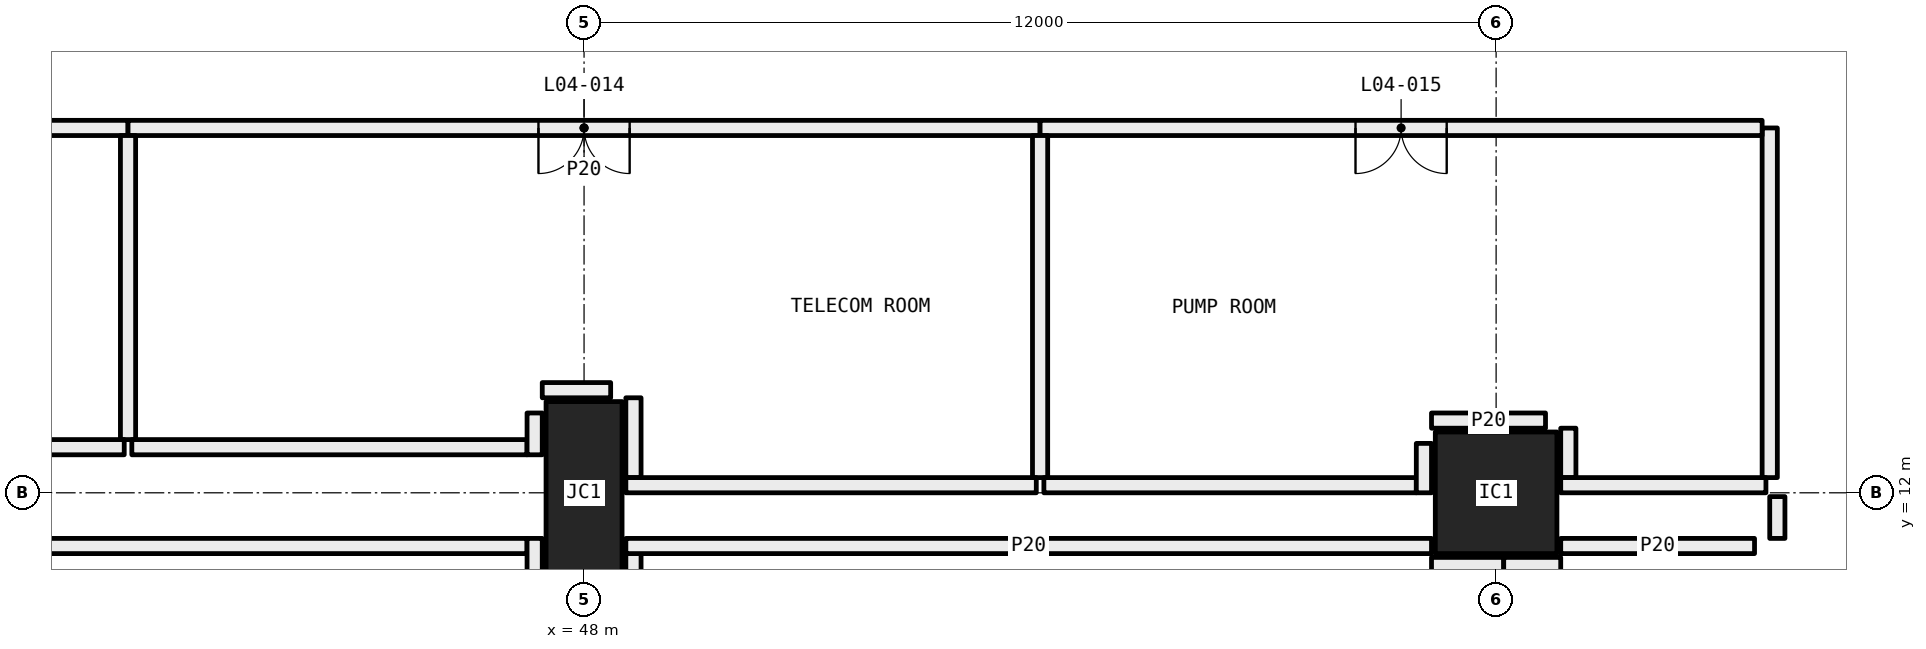
"""IFC4 building model, lengths in metres.
Left out: names, types, materials, properties, quantities, classifications, styles, units other than length and angle.
Written with IfcOpenShell. Run it as: python <this file> out.ifc"""

import sys

from ifc_helpers import new_model, si_unit, direction, frame, frame_2d, origin, origin_2d, place, context, subcontext, project, spatial, rectangle, hollow_rectangle, extrude, element, fill, save


model = new_model("IFC4")
c1 = context("Model", 3, precision=1e-05, world=origin(), true_north=direction((0.0, 1.0)))
c2 = subcontext(c1, "Body", "Model", "MODEL_VIEW")
j1 = project(units=[si_unit("LENGTHUNIT", "METRE"), si_unit("PLANEANGLEUNIT", "RADIAN")], contexts=[c1])
p1 = place(None, origin())
s1 = spatial("IfcSite", under=j1, at=p1, CompositionType="ELEMENT")
p2 = place(p1, origin())
s2 = spatial("IfcBuilding", under=s1, at=p2, CompositionType="ELEMENT")
p3 = place(p2, frame((0.0, 0.0, 24.0)))
s3 = spatial("IfcBuildingStorey", under=s2, at=p3, CompositionType="ELEMENT", Elevation=24.0)
p4 = place(p3, frame((48.0, 12.0, 0.0), z_axis=(0.0, 0.0, 1.0), x_axis=(0.0, 1.0, 0.0)))
e1 = element("IfcColumn", 1, at=p4, inside=s3, PredefinedType="COLUMN", context=c2, shape_type="SweptSolid", body=[
    extrude(hollow_rectangle(XDim=2.4, YDim=1.0, WallThickness=0.09, at=origin_2d()), origin(), (0.0, 0.0, 1.0), 5.6),
])
p5 = place(p3, frame((60.0, 12.0, 0.0), z_axis=(0.0, 0.0, 1.0), x_axis=(1.0, 0.0, 0.0)))
e2 = element("IfcColumn", 2, at=p5, inside=s3, PredefinedType="COLUMN", context=c2, shape_type="SweptSolid", body=[
    extrude(hollow_rectangle(XDim=1.6, YDim=1.6, WallThickness=0.07, at=origin_2d()), origin(), (0.0, 0.0, 1.0), 5.6),
])
p6 = place(p3, frame((42.0, 16.8, 0.0), z_axis=(0.0, 0.0, 1.0), x_axis=(-1.0, 0.0, 0.0)))
e3 = element("IfcWall", 3, at=p6, inside=s3, PredefinedType="PARTITIONING", context=c2, shape_type="SweptSolid", body=[
    extrude(rectangle(XDim=12.0, YDim=0.2, at=frame_2d((6.0, 0.0))), origin(), (0.0, 0.0, 1.0), 5.6),
])
p7 = place(p6, frame((5.4, 0.0, 0.0)))
e4 = element("IfcOpeningElement", 4, at=p7, cuts=e3, PredefinedType="OPENING", context=c2, shape_type="SweptSolid", body=[
    extrude(rectangle(XDim=1.2, YDim=2.1, at=frame_2d((0.6, 1.05))), frame((0.0, 0.11, 0.0), z_axis=(0.0, -1.0, 0.0), x_axis=(1.0, 0.0, 0.0)), (0.0, 0.0, 1.0), 0.22),
])
p8 = place(p3, frame((54.0, 16.8, 0.0), z_axis=(0.0, 0.0, 1.0), x_axis=(-1.0, 0.0, 0.0)))
e5 = element("IfcWall", 5, at=p8, inside=s3, PredefinedType="PARTITIONING", context=c2, shape_type="SweptSolid", body=[
    extrude(rectangle(XDim=12.0, YDim=0.2, at=frame_2d((6.0, 0.0))), origin(), (0.0, 0.0, 1.0), 5.6),
])
p9 = place(p8, frame((5.4, 0.0, 0.0)))
e6 = element("IfcOpeningElement", 6, at=p9, cuts=e5, PredefinedType="OPENING", context=c2, shape_type="SweptSolid", body=[
    extrude(rectangle(XDim=1.2, YDim=2.1, at=frame_2d((0.6, 1.05))), frame((0.0, 0.11, 0.0), z_axis=(0.0, -1.0, 0.0), x_axis=(1.0, 0.0, 0.0)), (0.0, 0.0, 1.0), 0.22),
])
p10 = place(p3, frame((63.6, 12.2, 0.0), z_axis=(0.0, 0.0, 1.0), x_axis=(0.0, 1.0, 0.0)))
e7 = element("IfcWall", 7, at=p10, inside=s3, PredefinedType="PARTITIONING", context=c2, shape_type="SweptSolid", body=[
    extrude(rectangle(XDim=4.6, YDim=0.2, at=frame_2d((2.3, 0.0))), origin(), (0.0, 0.0, 1.0), 5.6),
])
p11 = place(p3, frame((63.5, 16.8, 0.0), z_axis=(0.0, 0.0, 1.0), x_axis=(-1.0, 0.0, 0.0)))
e8 = element("IfcWall", 8, at=p11, inside=s3, PredefinedType="PARTITIONING", context=c2, shape_type="SweptSolid", body=[
    extrude(rectangle(XDim=9.5, YDim=0.2, at=frame_2d((4.75, 0.0))), origin(), (0.0, 0.0, 1.0), 5.6),
])
p12 = place(p11, frame((4.15, 0.0, 0.0)))
e9 = element("IfcOpeningElement", 9, at=p12, cuts=e8, PredefinedType="OPENING", context=c2, shape_type="SweptSolid", body=[
    extrude(rectangle(XDim=1.2, YDim=2.1, at=frame_2d((0.6, 1.05))), frame((0.0, 0.11, 0.0), z_axis=(0.0, -1.0, 0.0), x_axis=(1.0, 0.0, 0.0)), (0.0, 0.0, 1.0), 0.22),
])
p13 = place(p3, frame((42.0, 12.7, 0.0), z_axis=(0.0, 0.0, 1.0), x_axis=(0.0, 1.0, 0.0)))
e10 = element("IfcWall", 10, at=p13, inside=s3, PredefinedType="PARTITIONING", context=c2, shape_type="SweptSolid", body=[
    extrude(rectangle(XDim=4.0, YDim=0.2, at=frame_2d((2.0, 0.0))), origin(), (0.0, 0.0, 1.0), 5.6),
])
p14 = place(p3, frame((54.0, 12.2, 0.0), z_axis=(0.0, 0.0, 1.0), x_axis=(0.0, 1.0, 0.0)))
e11 = element("IfcWall", 11, at=p14, inside=s3, PredefinedType="PARTITIONING", context=c2, shape_type="SweptSolid", body=[
    extrude(rectangle(XDim=4.5, YDim=0.2, at=frame_2d((2.25, 0.0))), origin(), (0.0, 0.0, 1.0), 5.6),
])
p15 = place(p3, frame((24.55, 11.3, 0.0), z_axis=(0.0, 0.0, 1.0), x_axis=(1.0, 0.0, 0.0)))
e12 = element("IfcWall", 12, at=p15, inside=s3, PredefinedType="PARTITIONING", context=c2, shape_type="SweptSolid", body=[
    extrude(rectangle(XDim=22.7, YDim=0.2, at=frame_2d((11.35, 0.0))), origin(), (0.0, 0.0, 1.0), 5.6),
])
for number, where, z_axis, x_axis in (
    (13, (47.35, 11.4, 0.0), (0.0, 0.0, 1.0), (0.0, -1.0, 0.0)),
    (14, (48.65, 10.75, 0.0), (0.0, 0.0, 1.0), (0.0, 1.0, 0.0)),
):
    element("IfcWall", number, at=place(p3, frame(where, z_axis=z_axis, x_axis=x_axis)), inside=s3, PredefinedType="PARTITIONING", context=c2, shape_type="SweptSolid", body=[
        extrude(rectangle(XDim=0.45, YDim=0.2, at=frame_2d((0.225, 0.0))), origin(), (0.0, 0.0, 1.0), 5.6),
    ])
p16 = place(p3, frame((48.55, 11.3, 0.0), z_axis=(0.0, 0.0, 1.0), x_axis=(1.0, 0.0, 0.0)))
e15 = element("IfcWall", 15, at=p16, inside=s3, PredefinedType="PARTITIONING", context=c2, shape_type="SweptSolid", body=[
    extrude(rectangle(XDim=10.6, YDim=0.2, at=frame_2d((5.3, 0.0))), origin(), (0.0, 0.0, 1.0), 5.6),
])
p17 = place(p3, frame((59.15, 11.05, 0.0), z_axis=(0.0, 0.0, 1.0), x_axis=(1.0, 0.0, 0.0)))
e16 = element("IfcWall", 16, at=p17, inside=s3, PredefinedType="PARTITIONING", context=c2, shape_type="SweptSolid", body=[
    extrude(rectangle(XDim=0.95, YDim=0.2, at=frame_2d((0.475, 0.0))), origin(), (0.0, 0.0, 1.0), 5.0),
])
p18 = place(p3, frame((60.1, 11.05, 0.0), z_axis=(0.0, 0.0, 1.0), x_axis=(1.0, 0.0, 0.0)))
e17 = element("IfcWall", 17, at=p18, inside=s3, PredefinedType="PARTITIONING", context=c2, shape_type="SweptSolid", body=[
    extrude(rectangle(XDim=0.75, YDim=0.2, at=frame_2d((0.375, 0.0))), origin(), (0.0, 0.0, 1.0), 5.6),
])
p19 = place(p3, frame((60.85, 11.3, 0.0), z_axis=(0.0, 0.0, 1.0), x_axis=(1.0, 0.0, 0.0)))
e18 = element("IfcWall", 18, at=p19, inside=s3, PredefinedType="PARTITIONING", context=c2, shape_type="SweptSolid", body=[
    extrude(rectangle(XDim=2.55, YDim=0.2, at=frame_2d((1.275, 0.0))), origin(), (0.0, 0.0, 1.0), 5.6),
])
p20 = place(p3, frame((63.7, 11.4, 0.0), z_axis=(0.0, 0.0, 1.0), x_axis=(0.0, 1.0, 0.0)))
e19 = element("IfcWall", 19, at=p20, inside=s3, PredefinedType="PARTITIONING", context=c2, shape_type="SweptSolid", body=[
    extrude(rectangle(XDim=0.55, YDim=0.2, at=frame_2d((0.275, 0.0))), origin(), (0.0, 0.0, 1.0), 5.0),
])
p21 = place(p3, frame((30.05, 12.6, 0.0), z_axis=(0.0, 0.0, 1.0), x_axis=(1.0, 0.0, 0.0)))
e20 = element("IfcWall", 20, at=p21, inside=s3, PredefinedType="PARTITIONING", context=c2, shape_type="SweptSolid", body=[
    extrude(rectangle(XDim=11.9, YDim=0.2, at=frame_2d((5.95, 0.0))), origin(), (0.0, 0.0, 1.0), 5.6),
])
p22 = place(p3, frame((42.05, 12.6, 0.0), z_axis=(0.0, 0.0, 1.0), x_axis=(1.0, 0.0, 0.0)))
e21 = element("IfcWall", 21, at=p22, inside=s3, PredefinedType="PARTITIONING", context=c2, shape_type="SweptSolid", body=[
    extrude(rectangle(XDim=5.2, YDim=0.2, at=frame_2d((2.6, 0.0))), origin(), (0.0, 0.0, 1.0), 5.6),
])
p23 = place(p3, frame((47.35, 12.5, 0.0), z_axis=(0.0, 0.0, 1.0), x_axis=(0.0, 1.0, 0.0)))
e22 = element("IfcWall", 22, at=p23, inside=s3, PredefinedType="PARTITIONING", context=c2, shape_type="SweptSolid", body=[
    extrude(rectangle(XDim=0.55, YDim=0.2, at=frame_2d((0.275, 0.0))), origin(), (0.0, 0.0, 1.0), 5.6),
])
p24 = place(p3, frame((47.45, 13.35, 0.0), z_axis=(0.0, 0.0, 1.0), x_axis=(1.0, 0.0, 0.0)))
e23 = element("IfcWall", 23, at=p24, inside=s3, PredefinedType="PARTITIONING", context=c2, shape_type="SweptSolid", body=[
    extrude(rectangle(XDim=0.9, YDim=0.2, at=frame_2d((0.45, 0.0))), origin(), (0.0, 0.0, 1.0), 5.6),
])
p25 = place(p3, frame((48.65, 13.25, 0.0), z_axis=(0.0, 0.0, 1.0), x_axis=(0.0, -1.0, 0.0)))
e24 = element("IfcWall", 24, at=p25, inside=s3, PredefinedType="PARTITIONING", context=c2, shape_type="SweptSolid", body=[
    extrude(rectangle(XDim=1.05, YDim=0.2, at=frame_2d((0.525, 0.0))), origin(), (0.0, 0.0, 1.0), 5.6),
])
p26 = place(p3, frame((48.55, 12.1, 0.0), z_axis=(0.0, 0.0, 1.0), x_axis=(1.0, 0.0, 0.0)))
e25 = element("IfcWall", 25, at=p26, inside=s3, PredefinedType="PARTITIONING", context=c2, shape_type="SweptSolid", body=[
    extrude(rectangle(XDim=5.4, YDim=0.2, at=frame_2d((2.7, 0.0))), origin(), (0.0, 0.0, 1.0), 5.0),
])
p27 = place(p3, frame((54.05, 12.1, 0.0), z_axis=(0.0, 0.0, 1.0), x_axis=(1.0, 0.0, 0.0)))
e26 = element("IfcWall", 26, at=p27, inside=s3, PredefinedType="PARTITIONING", context=c2, shape_type="SweptSolid", body=[
    extrude(rectangle(XDim=4.9, YDim=0.2, at=frame_2d((2.45, 0.0))), origin(), (0.0, 0.0, 1.0), 5.0),
])
p28 = place(p3, frame((59.05, 12.0, 0.0), z_axis=(0.0, 0.0, 1.0), x_axis=(0.0, 1.0, 0.0)))
e27 = element("IfcWall", 27, at=p28, inside=s3, PredefinedType="PARTITIONING", context=c2, shape_type="SweptSolid", body=[
    extrude(rectangle(XDim=0.65, YDim=0.2, at=frame_2d((0.325, 0.0))), origin(), (0.0, 0.0, 1.0), 5.0),
])
p29 = place(p3, frame((59.15, 12.95, 0.0), z_axis=(0.0, 0.0, 1.0), x_axis=(1.0, 0.0, 0.0)))
e28 = element("IfcWall", 28, at=p29, inside=s3, PredefinedType="PARTITIONING", context=c2, shape_type="SweptSolid", body=[
    extrude(rectangle(XDim=1.5, YDim=0.2, at=frame_2d((0.75, 0.0))), origin(), (0.0, 0.0, 1.0), 5.6),
])
p30 = place(p3, frame((60.95, 12.85, 0.0), z_axis=(0.0, 0.0, 1.0), x_axis=(0.0, -1.0, 0.0)))
e29 = element("IfcWall", 29, at=p30, inside=s3, PredefinedType="PARTITIONING", context=c2, shape_type="SweptSolid", body=[
    extrude(rectangle(XDim=0.65, YDim=0.2, at=frame_2d((0.325, 0.0))), origin(), (0.0, 0.0, 1.0), 5.6),
])
p31 = place(p3, frame((60.85, 12.1, 0.0), z_axis=(0.0, 0.0, 1.0), x_axis=(1.0, 0.0, 0.0)))
e30 = element("IfcWall", 30, at=p31, inside=s3, PredefinedType="PARTITIONING", context=c2, shape_type="SweptSolid", body=[
    extrude(rectangle(XDim=2.7, YDim=0.2, at=frame_2d((1.35, 0.0))), origin(), (0.0, 0.0, 1.0), 5.0),
])
p32 = place(p9, origin())
e31 = element("IfcDoor", 31, at=p32, inside=s3, OperationType="DOUBLE_DOOR_SINGLE_SWING", PredefinedType="DOOR", context=c2, shape_type="SweptSolid", body=[
    extrude(rectangle(XDim=1.2, YDim=2.1, at=frame_2d((0.6, 1.05))), frame((0.0, 0.025, 0.0), z_axis=(0.0, -1.0, 0.0), x_axis=(1.0, 0.0, 0.0)), (0.0, 0.0, 1.0), 0.05),
])
fill(e6, e31)
p33 = place(p12, origin())
e32 = element("IfcDoor", 32, at=p33, inside=s3, OperationType="DOUBLE_DOOR_SINGLE_SWING", PredefinedType="DOOR", context=c2, shape_type="SweptSolid", body=[
    extrude(rectangle(XDim=1.2, YDim=2.1, at=frame_2d((0.6, 1.05))), frame((0.0, 0.025, 0.0), z_axis=(0.0, -1.0, 0.0), x_axis=(1.0, 0.0, 0.0)), (0.0, 0.0, 1.0), 0.05),
])
fill(e9, e32)
save(model, sys.argv[1])
